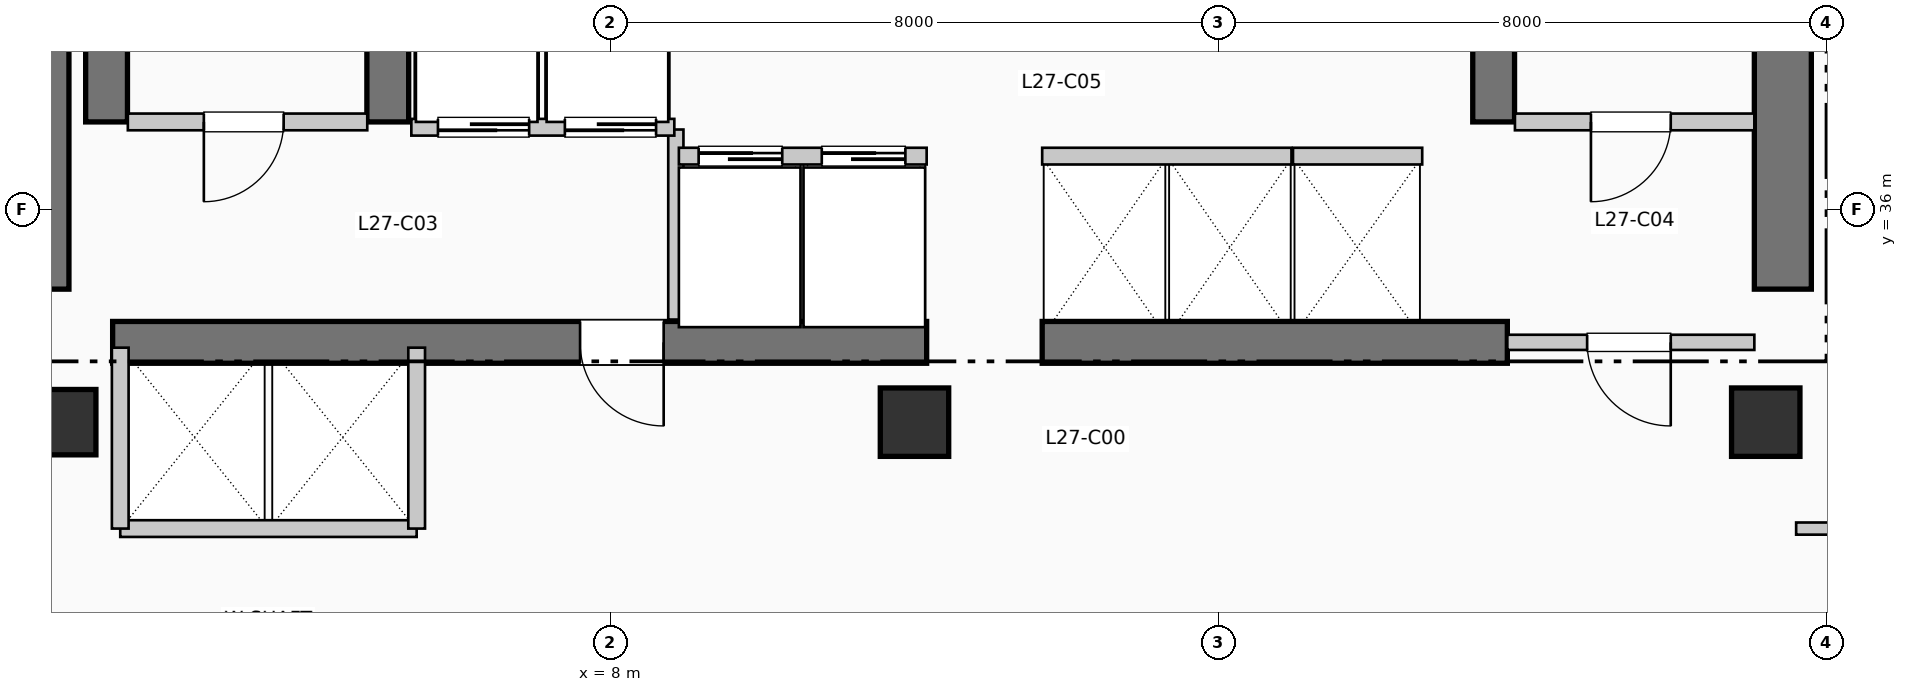
"""IFC4 building model, lengths in metres.
Left out: names, types, materials, properties, quantities, classifications, styles, units other than length and angle.
Written with IfcOpenShell. Run it as: python <this file> out.ifc"""

import sys

from ifc_helpers import new_model, si_unit, direction, frame, frame_2d, origin, origin_2d, place, context, subcontext, project, spatial, rectangle, extrude, element, fill, save


model = new_model("IFC4")
c1 = context("Model", 3, precision=1e-05, world=origin(), true_north=direction((0.0, 1.0)))
c2 = subcontext(c1, "Body", "Model", "MODEL_VIEW")
j1 = project(units=[si_unit("LENGTHUNIT", "METRE"), si_unit("PLANEANGLEUNIT", "RADIAN")], contexts=[c1])
p1 = place(None, origin())
s1 = spatial("IfcSite", under=j1, at=p1, CompositionType="ELEMENT")
p2 = place(p1, origin())
s2 = spatial("IfcBuilding", under=s1, at=p2, CompositionType="ELEMENT")
p3 = place(p2, frame((0.0, 0.0, 114.51)))
s3 = spatial("IfcBuildingStorey", under=s2, at=p3, CompositionType="ELEMENT", Elevation=114.51)
p4 = place(p3, frame((0.5, 34.95, 0.0), z_axis=(0.0, 0.0, 1.0), x_axis=(0.0, 1.0, 0.0)))
e1 = element("IfcWall", 1, at=p4, inside=s3, PredefinedType="SHEAR", context=c2, shape_type="SweptSolid", body=[
    extrude(rectangle(XDim=7.9, YDim=0.75, at=frame_2d((3.95, 0.0))), origin(), (0.0, 0.0, 1.0), 3.96),
])
p5 = place(p3, frame((23.425, 34.95, 0.0), z_axis=(0.0, 0.0, 1.0), x_axis=(0.0, 1.0, 0.0)))
e2 = element("IfcWall", 2, at=p5, inside=s3, PredefinedType="SHEAR", context=c2, shape_type="SweptSolid", body=[
    extrude(rectangle(XDim=10.64, YDim=0.75, at=frame_2d((5.32, 0.0))), origin(), (0.0, 0.0, 1.0), 3.96),
])
p6 = place(p3, frame((1.45, 34.25, 0.0), z_axis=(0.0, 0.0, 1.0), x_axis=(1.0, 0.0, 0.0)))
e3 = element("IfcWall", 3, at=p6, inside=s3, PredefinedType="SHEAR", context=c2, shape_type="SweptSolid", body=[
    extrude(rectangle(XDim=10.71, YDim=0.55, at=frame_2d((5.355, 0.0))), origin(), (0.0, 0.0, 1.0), 3.96),
])
p7 = place(p6, frame((7.25, 0.0, 0.0), z_axis=(0.0, 0.0, 1.0), x_axis=(-1.0, 0.0, 0.0)))
e4 = element("IfcOpeningElement", 4, at=p7, cuts=e3, PredefinedType="OPENING", context=c2, shape_type="SweptSolid", body=[
    extrude(rectangle(XDim=1.1, YDim=2.15, at=frame_2d((0.55, 1.075))), frame((0.0, 0.285, 0.0), z_axis=(0.0, -1.0, 0.0), x_axis=(1.0, 0.0, 0.0)), (0.0, 0.0, 1.0), 0.57),
])
p8 = place(p3, frame((13.68, 34.25, 0.0), z_axis=(0.0, 0.0, 1.0), x_axis=(1.0, 0.0, 0.0)))
e5 = element("IfcWall", 5, at=p8, inside=s3, PredefinedType="SHEAR", context=c2, shape_type="SweptSolid", body=[
    extrude(rectangle(XDim=6.12, YDim=0.55, at=frame_2d((3.06, 0.0))), origin(), (0.0, 0.0, 1.0), 3.96),
])
for number, where, z_axis, x_axis in (
    (6, (1.37, 37.15, 0.0), (0.0, 0.0, 1.0), (0.0, 1.0, 0.0)),
    (7, (5.07, 37.15, 0.0), (0.0, 0.0, 1.0), (0.0, 1.0, 0.0)),
    (8, (19.62, 37.15, 0.0), (0.0, 0.0, 1.0), (0.0, 1.0, 0.0)),
):
    element("IfcWall", number, at=place(p3, frame(where, z_axis=z_axis, x_axis=x_axis)), inside=s3, PredefinedType="SHEAR", context=c2, shape_type="SweptSolid", body=[
        extrude(rectangle(XDim=7.89, YDim=0.55, at=frame_2d((3.945, 0.0))), origin(), (0.0, 0.0, 1.0), 3.96),
    ])
p9 = place(p3, frame((0.8, 33.2, 0.0), z_axis=(0.0, 0.0, 1.0), x_axis=(1.0, 0.0, 0.0)))
e9 = element("IfcColumn", 9, at=p9, inside=s3, PredefinedType="COLUMN", context=c2, shape_type="SweptSolid", body=[
    extrude(rectangle(XDim=0.86, YDim=0.86, at=origin_2d()), origin(), (0.0, 0.0, 1.0), 3.96),
])
for number, where, z_axis, x_axis in (
    (10, (12.0, 33.2, 0.0), (0.0, 0.0, 1.0), (1.0, 0.0, 0.0)),
    (11, (23.2, 33.2, 0.0), (0.0, 0.0, 1.0), (1.0, 0.0, 0.0)),
):
    element("IfcColumn", number, at=place(p3, frame(where, z_axis=z_axis, x_axis=x_axis)), inside=s3, PredefinedType="COLUMN", context=c2, shape_type="SweptSolid", body=[
        extrude(rectangle(XDim=0.9, YDim=0.9, at=origin_2d()), origin(), (0.0, 0.0, 1.0), 3.96),
    ])
p10 = place(p3, frame((1.65, 37.15, 0.0), z_axis=(0.0, 0.0, 1.0), x_axis=(1.0, 0.0, 0.0)))
e12 = element("IfcWall", 12, at=p10, inside=s3, PredefinedType="PARTITIONING", context=c2, shape_type="SweptSolid", body=[
    extrude(rectangle(XDim=3.15, YDim=0.22, at=frame_2d((1.575, 0.0))), origin(), (0.0, 0.0, 1.0), 3.71),
])
p11 = place(p10, frame((2.05, 0.0, 0.0), z_axis=(0.0, 0.0, 1.0), x_axis=(-1.0, 0.0, 0.0)))
e13 = element("IfcOpeningElement", 13, at=p11, cuts=e12, PredefinedType="OPENING", context=c2, shape_type="SweptSolid", body=[
    extrude(rectangle(XDim=1.05, YDim=2.15, at=frame_2d((0.525, 1.075))), frame((0.0, 0.12, 0.0), z_axis=(0.0, -1.0, 0.0), x_axis=(1.0, 0.0, 0.0)), (0.0, 0.0, 1.0), 0.24),
])
p12 = place(p3, frame((8.86, 34.55, 0.0), z_axis=(0.0, 0.0, 1.0), x_axis=(0.0, 1.0, 0.0)))
e14 = element("IfcWall", 14, at=p12, inside=s3, PredefinedType="PARTITIONING", context=c2, shape_type="SweptSolid", body=[
    extrude(rectangle(XDim=2.5, YDim=0.2, at=frame_2d((1.25, 0.0))), origin(), (0.0, 0.0, 1.0), 3.71),
])
p13 = place(p3, frame((19.9, 37.15, 0.0), z_axis=(0.0, 0.0, 1.0), x_axis=(1.0, 0.0, 0.0)))
e15 = element("IfcWall", 15, at=p13, inside=s3, PredefinedType="PARTITIONING", context=c2, shape_type="SweptSolid", body=[
    extrude(rectangle(XDim=3.15, YDim=0.22, at=frame_2d((1.575, 0.0))), origin(), (0.0, 0.0, 1.0), 3.71),
])
p14 = place(p13, frame((2.05, 0.0, 0.0), z_axis=(0.0, 0.0, 1.0), x_axis=(-1.0, 0.0, 0.0)))
e16 = element("IfcOpeningElement", 16, at=p14, cuts=e15, PredefinedType="OPENING", context=c2, shape_type="SweptSolid", body=[
    extrude(rectangle(XDim=1.05, YDim=2.15, at=frame_2d((0.525, 1.075))), frame((0.0, 0.12, 0.0), z_axis=(0.0, -1.0, 0.0), x_axis=(1.0, 0.0, 0.0)), (0.0, 0.0, 1.0), 0.24),
])
p15 = place(p3, frame((19.8, 34.25, 0.0), z_axis=(0.0, 0.0, 1.0), x_axis=(1.0, 0.0, 0.0)))
e17 = element("IfcWall", 17, at=p15, inside=s3, PredefinedType="PARTITIONING", context=c2, shape_type="SweptSolid", body=[
    extrude(rectangle(XDim=3.25, YDim=0.2, at=frame_2d((1.625, 0.0))), origin(), (0.0, 0.0, 1.0), 3.71),
])
p16 = place(p15, frame((2.15, 0.0, 0.0), z_axis=(0.0, 0.0, 1.0), x_axis=(-1.0, 0.0, 0.0)))
e18 = element("IfcOpeningElement", 18, at=p16, cuts=e17, PredefinedType="OPENING", context=c2, shape_type="SweptSolid", body=[
    extrude(rectangle(XDim=1.1, YDim=2.15, at=frame_2d((0.55, 1.075))), frame((0.0, 0.11, 0.0), z_axis=(0.0, -1.0, 0.0), x_axis=(1.0, 0.0, 0.0)), (0.0, 0.0, 1.0), 0.22),
])
p17 = place(p3, frame((5.38, 37.08, 0.0), z_axis=(0.0, 0.0, 1.0), x_axis=(1.0, 0.0, 0.0)))
e19 = element("IfcWall", 19, at=p17, inside=s3, PredefinedType="PARTITIONING", context=c2, shape_type="SweptSolid", body=[
    extrude(rectangle(XDim=3.46, YDim=0.22, at=frame_2d((1.73, 0.0))), origin(), (0.0, 0.0, 1.0), 3.71),
])
p18 = place(p17, frame((1.55, 0.0, 0.0), z_axis=(0.0, 0.0, 1.0), x_axis=(-1.0, 0.0, 0.0)))
e20 = element("IfcOpeningElement", 20, at=p18, cuts=e19, PredefinedType="OPENING", context=c2, shape_type="SweptSolid", body=[
    extrude(rectangle(XDim=1.2, YDim=2.2, at=frame_2d((0.6, 1.1))), frame((0.0, 0.12, 0.0), z_axis=(0.0, -1.0, 0.0), x_axis=(1.0, 0.0, 0.0)), (0.0, 0.0, 1.0), 0.24),
])
p19 = place(p17, frame((3.22, 0.0, 0.0), z_axis=(0.0, 0.0, 1.0), x_axis=(-1.0, 0.0, 0.0)))
e21 = element("IfcOpeningElement", 21, at=p19, cuts=e19, PredefinedType="OPENING", context=c2, shape_type="SweptSolid", body=[
    extrude(rectangle(XDim=1.2, YDim=2.2, at=frame_2d((0.6, 1.1))), frame((0.0, 0.12, 0.0), z_axis=(0.0, -1.0, 0.0), x_axis=(1.0, 0.0, 0.0)), (0.0, 0.0, 1.0), 0.24),
])
p20 = place(p3, frame((1.55, 31.8, 0.0), z_axis=(0.0, 0.0, 1.0), x_axis=(1.0, 0.0, 0.0)))
e22 = element("IfcWall", 22, at=p20, inside=s3, PredefinedType="PARTITIONING", context=c2, shape_type="SweptSolid", body=[
    extrude(rectangle(XDim=3.9, YDim=0.22, at=frame_2d((1.95, 0.0))), origin(), (0.0, 0.0, 1.0), 3.71),
])
for number, where, z_axis, x_axis in (
    (23, (1.55, 31.8, 0.0), (0.0, 0.0, 1.0), (0.0, 1.0, 0.0)),
    (24, (5.45, 31.8, 0.0), (0.0, 0.0, 1.0), (0.0, 1.0, 0.0)),
):
    element("IfcWall", number, at=place(p3, frame(where, z_axis=z_axis, x_axis=x_axis)), inside=s3, PredefinedType="PARTITIONING", context=c2, shape_type="SweptSolid", body=[
        extrude(rectangle(XDim=2.38, YDim=0.22, at=frame_2d((1.19, 0.0))), origin(), (0.0, 0.0, 1.0), 3.71),
    ])
p21 = place(p3, frame((8.9, 36.7, 0.0), z_axis=(0.0, 0.0, 1.0), x_axis=(1.0, 0.0, 0.0)))
e25 = element("IfcWall", 25, at=p21, inside=s3, PredefinedType="PARTITIONING", context=c2, shape_type="SweptSolid", body=[
    extrude(rectangle(XDim=3.26, YDim=0.22, at=frame_2d((1.63, 0.0))), origin(), (0.0, 0.0, 1.0), 3.71),
])
p22 = place(p21, frame((0.26, 0.0, 0.0)))
e26 = element("IfcOpeningElement", 26, at=p22, cuts=e25, PredefinedType="OPENING", context=c2, shape_type="SweptSolid", body=[
    extrude(rectangle(XDim=1.1, YDim=2.2, at=frame_2d((0.55, 1.1))), frame((0.0, 0.12, 0.0), z_axis=(0.0, -1.0, 0.0), x_axis=(1.0, 0.0, 0.0)), (0.0, 0.0, 1.0), 0.24),
])
p23 = place(p21, frame((1.88, 0.0, 0.0)))
e27 = element("IfcOpeningElement", 27, at=p23, cuts=e25, PredefinedType="OPENING", context=c2, shape_type="SweptSolid", body=[
    extrude(rectangle(XDim=1.1, YDim=2.2, at=frame_2d((0.55, 1.1))), frame((0.0, 0.12, 0.0), z_axis=(0.0, -1.0, 0.0), x_axis=(1.0, 0.0, 0.0)), (0.0, 0.0, 1.0), 0.24),
])
p24 = place(p3, frame((13.68, 36.7, 0.0), z_axis=(0.0, 0.0, 1.0), x_axis=(1.0, 0.0, 0.0)))
e28 = element("IfcWall", 28, at=p24, inside=s3, PredefinedType="PARTITIONING", context=c2, shape_type="SweptSolid", body=[
    extrude(rectangle(XDim=3.28, YDim=0.22, at=frame_2d((1.64, 0.0))), origin(), (0.0, 0.0, 1.0), 3.71),
])
p25 = place(p3, frame((16.98, 36.7, 0.0), z_axis=(0.0, 0.0, 1.0), x_axis=(1.0, 0.0, 0.0)))
e29 = element("IfcWall", 29, at=p25, inside=s3, PredefinedType="PARTITIONING", context=c2, shape_type="SweptSolid", body=[
    extrude(rectangle(XDim=1.7, YDim=0.22, at=frame_2d((0.85, 0.0))), origin(), (0.0, 0.0, 1.0), 3.71),
])
p26 = place(p3, frame((23.6, 31.8, 0.0), z_axis=(0.0, 0.0, 1.0), x_axis=(1.0, 0.0, 0.0)))
e30 = element("IfcWall", 30, at=p26, inside=s3, PredefinedType="PARTITIONING", context=c2, shape_type="SweptSolid", body=[
    extrude(rectangle(XDim=26.41, YDim=0.16, at=frame_2d((13.205, 0.0))), origin(), (0.0, 0.0, 1.0), 3.71),
])
p27 = place(p26, frame((12.73, 0.0, 0.0)))
e31 = element("IfcOpeningElement", 31, at=p27, cuts=e30, PredefinedType="OPENING", context=c2, shape_type="SweptSolid", body=[
    extrude(rectangle(XDim=0.95, YDim=2.15, at=frame_2d((0.475, 1.075))), frame((0.0, 0.09, 0.0), z_axis=(0.0, -1.0, 0.0), x_axis=(1.0, 0.0, 0.0)), (0.0, 0.0, 1.0), 0.18),
])
p28 = place(p11, origin())
e32 = element("IfcDoor", 32, at=p28, inside=s3, OperationType="SINGLE_SWING_LEFT", PredefinedType="DOOR", context=c2, shape_type="SweptSolid", body=[
    extrude(rectangle(XDim=1.05, YDim=2.15, at=frame_2d((0.525, 1.075))), frame((0.0, 0.025, 0.0), z_axis=(0.0, -1.0, 0.0), x_axis=(1.0, 0.0, 0.0)), (0.0, 0.0, 1.0), 0.05),
])
fill(e13, e32)
p29 = place(p7, origin())
e33 = element("IfcDoor", 33, at=p29, inside=s3, OperationType="SINGLE_SWING_RIGHT", PredefinedType="DOOR", context=c2, shape_type="SweptSolid", body=[
    extrude(rectangle(XDim=1.1, YDim=2.15, at=frame_2d((0.55, 1.075))), frame((0.0, 0.025, 0.0), z_axis=(0.0, -1.0, 0.0), x_axis=(1.0, 0.0, 0.0)), (0.0, 0.0, 1.0), 0.05),
])
fill(e4, e33)
p30 = place(p14, origin())
e34 = element("IfcDoor", 34, at=p30, inside=s3, OperationType="SINGLE_SWING_LEFT", PredefinedType="DOOR", context=c2, shape_type="SweptSolid", body=[
    extrude(rectangle(XDim=1.05, YDim=2.15, at=frame_2d((0.525, 1.075))), frame((0.0, 0.025, 0.0), z_axis=(0.0, -1.0, 0.0), x_axis=(1.0, 0.0, 0.0)), (0.0, 0.0, 1.0), 0.05),
])
fill(e16, e34)
p31 = place(p16, origin())
e35 = element("IfcDoor", 35, at=p31, inside=s3, OperationType="SINGLE_SWING_RIGHT", PredefinedType="DOOR", context=c2, shape_type="SweptSolid", body=[
    extrude(rectangle(XDim=1.1, YDim=2.15, at=frame_2d((0.55, 1.075))), frame((0.0, 0.025, 0.0), z_axis=(0.0, -1.0, 0.0), x_axis=(1.0, 0.0, 0.0)), (0.0, 0.0, 1.0), 0.05),
])
fill(e18, e35)
p32 = place(p18, origin())
e36 = element("IfcDoor", 36, at=p32, inside=s3, OperationType="SLIDING_TO_RIGHT", PredefinedType="DOOR", context=c2, shape_type="SweptSolid", body=[
    extrude(rectangle(XDim=1.2, YDim=2.2, at=frame_2d((0.6, 1.1))), frame((0.0, 0.025, 0.0), z_axis=(0.0, -1.0, 0.0), x_axis=(1.0, 0.0, 0.0)), (0.0, 0.0, 1.0), 0.05),
])
fill(e20, e36)
p33 = place(p19, origin())
e37 = element("IfcDoor", 37, at=p33, inside=s3, OperationType="SLIDING_TO_RIGHT", PredefinedType="DOOR", context=c2, shape_type="SweptSolid", body=[
    extrude(rectangle(XDim=1.2, YDim=2.2, at=frame_2d((0.6, 1.1))), frame((0.0, 0.025, 0.0), z_axis=(0.0, -1.0, 0.0), x_axis=(1.0, 0.0, 0.0)), (0.0, 0.0, 1.0), 0.05),
])
fill(e21, e37)
p34 = place(p22, origin())
e38 = element("IfcDoor", 38, at=p34, inside=s3, OperationType="SLIDING_TO_LEFT", PredefinedType="DOOR", context=c2, shape_type="SweptSolid", body=[
    extrude(rectangle(XDim=1.1, YDim=2.2, at=frame_2d((0.55, 1.1))), frame((0.0, 0.025, 0.0), z_axis=(0.0, -1.0, 0.0), x_axis=(1.0, 0.0, 0.0)), (0.0, 0.0, 1.0), 0.05),
])
fill(e26, e38)
p35 = place(p23, origin())
e39 = element("IfcDoor", 39, at=p35, inside=s3, OperationType="SLIDING_TO_LEFT", PredefinedType="DOOR", context=c2, shape_type="SweptSolid", body=[
    extrude(rectangle(XDim=1.1, YDim=2.2, at=frame_2d((0.55, 1.1))), frame((0.0, 0.025, 0.0), z_axis=(0.0, -1.0, 0.0), x_axis=(1.0, 0.0, 0.0)), (0.0, 0.0, 1.0), 0.05),
])
fill(e27, e39)
save(model, sys.argv[1])
